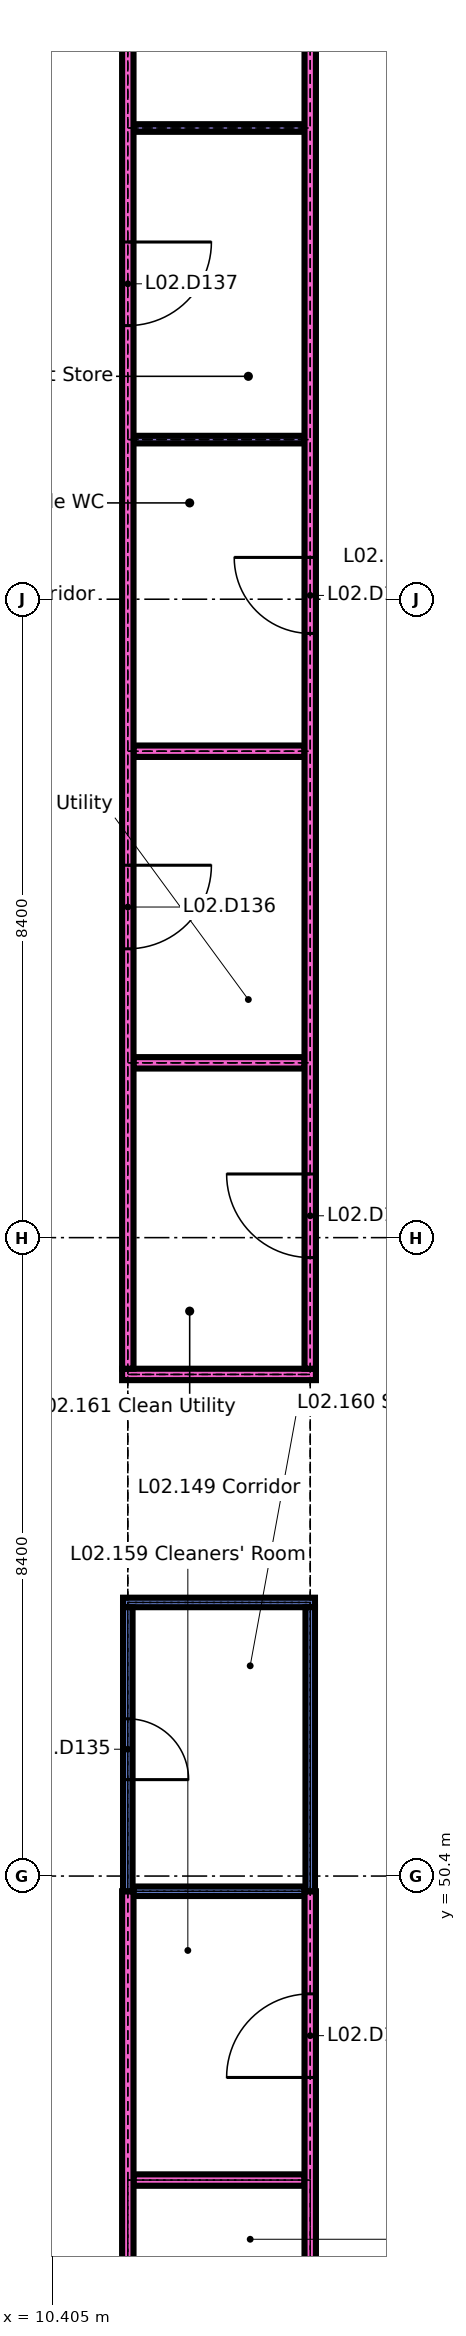
"""IFC4 building model, lengths in metres.
Left out: names, types, materials, properties, quantities, classifications, styles, units other than length and angle.
Written with IfcOpenShell. Run it as: python <this file> out.ifc"""

import sys

from ifc_helpers import new_model, si_unit, direction, frame, frame_2d, origin, place, context, subcontext, project, spatial, rectangle, extrude, element, fill, save


model = new_model("IFC4")
c1 = context("Model", 3, precision=1e-05, world=origin(), true_north=direction((0.0, 1.0)))
c2 = subcontext(c1, "Body", "Model", "MODEL_VIEW")
j1 = project(units=[si_unit("LENGTHUNIT", "METRE"), si_unit("PLANEANGLEUNIT", "RADIAN")], contexts=[c1])
p1 = place(None, origin())
s1 = spatial("IfcSite", under=j1, at=p1, CompositionType="ELEMENT")
p2 = place(p1, origin())
s2 = spatial("IfcBuilding", under=s1, at=p2, CompositionType="ELEMENT")
p3 = place(p2, frame((0.0, 0.0, 8.4)))
s3 = spatial("IfcBuildingStorey", under=s2, at=p3, CompositionType="ELEMENT", Elevation=8.4)
p4 = place(p3, frame((11.475, 46.4, 0.0), z_axis=(0.0, 0.0, 1.0), x_axis=(1.0, 0.0, 0.0)))
e1 = element("IfcWall", 1, at=p4, inside=s3, PredefinedType="PARTITIONING", context=c2, shape_type="SweptSolid", body=[
    extrude(rectangle(XDim=2.25, YDim=0.15, at=frame_2d((1.125, 0.0))), origin(), (0.0, 0.0, 1.0), 4.2),
])
p5 = place(p3, frame((11.475, 50.2, 0.0), z_axis=(0.0, 0.0, 1.0), x_axis=(1.0, 0.0, 0.0)))
e2 = element("IfcWall", 2, at=p5, inside=s3, PredefinedType="SOLIDWALL", context=c2, shape_type="SweptSolid", body=[
    extrude(rectangle(XDim=2.25, YDim=0.125, at=frame_2d((1.125, 0.0))), origin(), (0.0, 0.0, 1.0), 4.2),
])
p6 = place(p3, frame((11.337, 54.0, 0.0), z_axis=(0.0, 0.0, 1.0), x_axis=(1.0, 0.0, 0.0)))
e3 = element("IfcWall", 3, at=p6, inside=s3, PredefinedType="SOLIDWALL", context=c2, shape_type="SweptSolid", body=[
    extrude(rectangle(XDim=2.525, YDim=0.125, at=frame_2d((1.263, 0.0))), origin(), (0.0, 0.0, 1.0), 4.2),
])
p7 = place(p3, frame((11.325, 57.0, 0.0), z_axis=(0.0, 0.0, 1.0), x_axis=(1.0, 0.0, 0.0)))
e4 = element("IfcWall", 4, at=p7, inside=s3, PredefinedType="PARTITIONING", context=c2, shape_type="SweptSolid", body=[
    extrude(rectangle(XDim=2.55, YDim=0.15, at=frame_2d((1.275, 0.0))), origin(), (0.0, 0.0, 1.0), 4.2),
])
for number, where, z_axis, x_axis in (
    (5, (11.475, 61.1, 0.0), (0.0, 0.0, 1.0), (1.0, 0.0, 0.0)),
    (6, (11.475, 65.2, 0.0), (0.0, 0.0, 1.0), (1.0, 0.0, 0.0)),
):
    element("IfcWall", number, at=place(p3, frame(where, z_axis=z_axis, x_axis=x_axis)), inside=s3, PredefinedType="PARTITIONING", context=c2, shape_type="SweptSolid", body=[
        extrude(rectangle(XDim=2.25, YDim=0.15, at=frame_2d((1.125, 0.0))), origin(), (0.0, 0.0, 1.0), 4.2),
    ])
for number, where, z_axis, x_axis in (
    (7, (11.475, 69.3, 0.0), (0.0, 0.0, 1.0), (1.0, 0.0, 0.0)),
    (8, (11.475, 73.4, 0.0), (0.0, 0.0, 1.0), (1.0, 0.0, 0.0)),
):
    element("IfcWall", number, at=place(p3, frame(where, z_axis=z_axis, x_axis=x_axis)), inside=s3, PredefinedType="PARTITIONING", context=c2, shape_type="SweptSolid", body=[
        extrude(rectangle(XDim=2.25, YDim=0.1, at=frame_2d((1.125, 0.0))), origin(), (0.0, 0.0, 1.0), 4.2),
    ])
p8 = place(p3, frame((11.4, 31.275, 0.0), z_axis=(0.0, 0.0, 1.0), x_axis=(0.0, 1.0, 0.0)))
e9 = element("IfcWall", 9, at=p8, inside=s3, PredefinedType="PARTITIONING", context=c2, shape_type="SweptSolid", body=[
    extrude(rectangle(XDim=18.925, YDim=0.15, at=frame_2d((9.462, 0.0))), origin(), (0.0, 0.0, 1.0), 4.2),
])
p9 = place(p8, frame((5.125, 0.0, 0.0)))
e10 = element("IfcOpeningElement", 10, at=p9, cuts=e9, PredefinedType="OPENING", context=c2, shape_type="SweptSolid", body=[
    extrude(rectangle(XDim=1.0, YDim=2.1, at=frame_2d((0.5, 1.05))), frame((0.0, 0.085, 0.0), z_axis=(0.0, -1.0, 0.0), x_axis=(1.0, 0.0, 0.0)), (0.0, 0.0, 1.0), 0.17),
])
p10 = place(p8, frame((12.725, 0.0, 0.0)))
e11 = element("IfcOpeningElement", 11, at=p10, cuts=e9, PredefinedType="OPENING", context=c2, shape_type="SweptSolid", body=[
    extrude(rectangle(XDim=1.0, YDim=2.1, at=frame_2d((0.5, 1.05))), frame((0.0, 0.085, 0.0), z_axis=(0.0, -1.0, 0.0), x_axis=(1.0, 0.0, 0.0)), (0.0, 0.0, 1.0), 0.17),
])
p11 = place(p3, frame((11.4, 50.2, 0.0), z_axis=(0.0, 0.0, 1.0), x_axis=(0.0, 1.0, 0.0)))
e12 = element("IfcWall", 12, at=p11, inside=s3, PredefinedType="SOLIDWALL", context=c2, shape_type="SweptSolid", body=[
    extrude(rectangle(XDim=3.738, YDim=0.125, at=frame_2d((1.869, 0.0))), origin(), (0.0, 0.0, 1.0), 4.2),
])
p12 = place(p11, frame((1.469, 0.0, 0.0)))
e13 = element("IfcOpeningElement", 13, at=p12, cuts=e12, PredefinedType="OPENING", context=c2, shape_type="SweptSolid", body=[
    extrude(rectangle(XDim=0.8, YDim=2.1, at=frame_2d((0.4, 1.05))), frame((0.0, 0.073, 0.0), z_axis=(0.0, -1.0, 0.0), x_axis=(1.0, 0.0, 0.0)), (0.0, 0.0, 1.0), 0.145),
])
p13 = place(p3, frame((11.4, 57.075, 0.0), z_axis=(0.0, 0.0, 1.0), x_axis=(0.0, 1.0, 0.0)))
e14 = element("IfcWall", 14, at=p13, inside=s3, PredefinedType="PARTITIONING", context=c2, shape_type="SweptSolid", body=[
    extrude(rectangle(XDim=32.85, YDim=0.15, at=frame_2d((16.425, 0.0))), origin(), (0.0, 0.0, 1.0), 4.2),
])
p14 = place(p13, frame((5.525, 0.0, 0.0)))
e15 = element("IfcOpeningElement", 15, at=p14, cuts=e14, PredefinedType="OPENING", context=c2, shape_type="SweptSolid", body=[
    extrude(rectangle(XDim=1.1, YDim=2.1, at=frame_2d((0.55, 1.05))), frame((0.0, 0.085, 0.0), z_axis=(0.0, -1.0, 0.0), x_axis=(1.0, 0.0, 0.0)), (0.0, 0.0, 1.0), 0.17),
])
p15 = place(p13, frame((13.725, 0.0, 0.0)))
e16 = element("IfcOpeningElement", 16, at=p15, cuts=e14, PredefinedType="OPENING", context=c2, shape_type="SweptSolid", body=[
    extrude(rectangle(XDim=1.1, YDim=2.1, at=frame_2d((0.55, 1.05))), frame((0.0, 0.085, 0.0), z_axis=(0.0, -1.0, 0.0), x_axis=(1.0, 0.0, 0.0)), (0.0, 0.0, 1.0), 0.17),
])
p16 = place(p13, frame((21.925, 0.0, 0.0)))
e17 = element("IfcOpeningElement", 17, at=p16, cuts=e14, PredefinedType="OPENING", context=c2, shape_type="SweptSolid", body=[
    extrude(rectangle(XDim=1.1, YDim=2.1, at=frame_2d((0.55, 1.05))), frame((0.0, 0.085, 0.0), z_axis=(0.0, -1.0, 0.0), x_axis=(1.0, 0.0, 0.0)), (0.0, 0.0, 1.0), 0.17),
])
p17 = place(p13, frame((30.188, 0.0, 0.0)))
e18 = element("IfcOpeningElement", 18, at=p17, cuts=e14, PredefinedType="OPENING", context=c2, shape_type="SweptSolid", body=[
    extrude(rectangle(XDim=1.1, YDim=2.1, at=frame_2d((0.55, 1.05))), frame((0.0, 0.085, 0.0), z_axis=(0.0, -1.0, 0.0), x_axis=(1.0, 0.0, 0.0)), (0.0, 0.0, 1.0), 0.17),
])
p18 = place(p3, frame((13.8, 31.275, 0.0), z_axis=(0.0, 0.0, 1.0), x_axis=(0.0, 1.0, 0.0)))
e19 = element("IfcWall", 19, at=p18, inside=s3, PredefinedType="PARTITIONING", context=c2, shape_type="SweptSolid", body=[
    extrude(rectangle(XDim=18.925, YDim=0.15, at=frame_2d((9.462, 0.0))), origin(), (0.0, 0.0, 1.0), 4.2),
])
p19 = place(p18, frame((1.312, 0.0, 0.0)))
e20 = element("IfcOpeningElement", 20, at=p19, cuts=e19, PredefinedType="OPENING", context=c2, shape_type="SweptSolid", body=[
    extrude(rectangle(XDim=1.1, YDim=2.1, at=frame_2d((0.55, 1.05))), frame((0.0, 0.085, 0.0), z_axis=(0.0, -1.0, 0.0), x_axis=(1.0, 0.0, 0.0)), (0.0, 0.0, 1.0), 0.17),
])
p20 = place(p18, frame((8.875, 0.0, 0.0)))
e21 = element("IfcOpeningElement", 21, at=p20, cuts=e19, PredefinedType="OPENING", context=c2, shape_type="SweptSolid", body=[
    extrude(rectangle(XDim=1.1, YDim=2.1, at=frame_2d((0.55, 1.05))), frame((0.0, 0.085, 0.0), z_axis=(0.0, -1.0, 0.0), x_axis=(1.0, 0.0, 0.0)), (0.0, 0.0, 1.0), 0.17),
])
p21 = place(p18, frame((16.475, 0.0, 0.0)))
e22 = element("IfcOpeningElement", 22, at=p21, cuts=e19, PredefinedType="OPENING", context=c2, shape_type="SweptSolid", body=[
    extrude(rectangle(XDim=1.1, YDim=2.1, at=frame_2d((0.55, 1.05))), frame((0.0, 0.085, 0.0), z_axis=(0.0, -1.0, 0.0), x_axis=(1.0, 0.0, 0.0)), (0.0, 0.0, 1.0), 0.17),
])
p22 = place(p3, frame((13.8, 50.2, 0.0), z_axis=(0.0, 0.0, 1.0), x_axis=(0.0, 1.0, 0.0)))
e23 = element("IfcWall", 23, at=p22, inside=s3, PredefinedType="SOLIDWALL", context=c2, shape_type="SweptSolid", body=[
    extrude(rectangle(XDim=3.738, YDim=0.125, at=frame_2d((1.869, 0.0))), origin(), (0.0, 0.0, 1.0), 4.2),
])
p23 = place(p3, frame((13.8, 57.075, 0.0), z_axis=(0.0, 0.0, 1.0), x_axis=(0.0, 1.0, 0.0)))
e24 = element("IfcWall", 24, at=p23, inside=s3, PredefinedType="PARTITIONING", context=c2, shape_type="SweptSolid", body=[
    extrude(rectangle(XDim=32.85, YDim=0.15, at=frame_2d((16.425, 0.0))), origin(), (0.0, 0.0, 1.0), 4.2),
])
p24 = place(p23, frame((1.462, 0.0, 0.0)))
e25 = element("IfcOpeningElement", 25, at=p24, cuts=e24, PredefinedType="OPENING", context=c2, shape_type="SweptSolid", body=[
    extrude(rectangle(XDim=1.1, YDim=2.1, at=frame_2d((0.55, 1.05))), frame((0.0, 0.085, 0.0), z_axis=(0.0, -1.0, 0.0), x_axis=(1.0, 0.0, 0.0)), (0.0, 0.0, 1.0), 0.17),
])
p25 = place(p23, frame((9.675, 0.0, 0.0)))
e26 = element("IfcOpeningElement", 26, at=p25, cuts=e24, PredefinedType="OPENING", context=c2, shape_type="SweptSolid", body=[
    extrude(rectangle(XDim=1.0, YDim=2.1, at=frame_2d((0.5, 1.05))), frame((0.0, 0.085, 0.0), z_axis=(0.0, -1.0, 0.0), x_axis=(1.0, 0.0, 0.0)), (0.0, 0.0, 1.0), 0.17),
])
p26 = place(p23, frame((17.875, 0.0, 0.0)))
e27 = element("IfcOpeningElement", 27, at=p26, cuts=e24, PredefinedType="OPENING", context=c2, shape_type="SweptSolid", body=[
    extrude(rectangle(XDim=1.0, YDim=2.1, at=frame_2d((0.5, 1.05))), frame((0.0, 0.085, 0.0), z_axis=(0.0, -1.0, 0.0), x_axis=(1.0, 0.0, 0.0)), (0.0, 0.0, 1.0), 0.17),
])
p27 = place(p23, frame((26.075, 0.0, 0.0)))
e28 = element("IfcOpeningElement", 28, at=p27, cuts=e24, PredefinedType="OPENING", context=c2, shape_type="SweptSolid", body=[
    extrude(rectangle(XDim=1.0, YDim=2.1, at=frame_2d((0.5, 1.05))), frame((0.0, 0.085, 0.0), z_axis=(0.0, -1.0, 0.0), x_axis=(1.0, 0.0, 0.0)), (0.0, 0.0, 1.0), 0.17),
])
p28 = place(p12, origin())
e29 = element("IfcDoor", 29, at=p28, inside=s3, OperationType="SINGLE_SWING_LEFT", PredefinedType="DOOR", context=c2, shape_type="SweptSolid", body=[
    extrude(rectangle(XDim=0.8, YDim=2.1, at=frame_2d((0.4, 1.05))), frame((0.0, 0.03, 0.0), z_axis=(0.0, -1.0, 0.0), x_axis=(1.0, 0.0, 0.0)), (0.0, 0.0, 1.0), 0.06),
])
fill(e13, e29)
p29 = place(p14, origin())
e30 = element("IfcDoor", 30, at=p29, inside=s3, OperationType="SINGLE_SWING_RIGHT", PredefinedType="DOOR", context=c2, shape_type="SweptSolid", body=[
    extrude(rectangle(XDim=1.1, YDim=2.1, at=frame_2d((0.55, 1.05))), frame((0.0, 0.025, 0.0), z_axis=(0.0, -1.0, 0.0), x_axis=(1.0, 0.0, 0.0)), (0.0, 0.0, 1.0), 0.05),
])
fill(e15, e30)
p30 = place(p15, origin())
e31 = element("IfcDoor", 31, at=p30, inside=s3, OperationType="SINGLE_SWING_RIGHT", PredefinedType="DOOR", context=c2, shape_type="SweptSolid", body=[
    extrude(rectangle(XDim=1.1, YDim=2.1, at=frame_2d((0.55, 1.05))), frame((0.0, 0.025, 0.0), z_axis=(0.0, -1.0, 0.0), x_axis=(1.0, 0.0, 0.0)), (0.0, 0.0, 1.0), 0.05),
])
fill(e16, e31)
p31 = place(p21, origin())
e32 = element("IfcDoor", 32, at=p31, inside=s3, OperationType="SINGLE_SWING_RIGHT", PredefinedType="DOOR", context=c2, shape_type="SweptSolid", body=[
    extrude(rectangle(XDim=1.1, YDim=2.1, at=frame_2d((0.55, 1.05))), frame((0.0, 0.025, 0.0), z_axis=(0.0, -1.0, 0.0), x_axis=(1.0, 0.0, 0.0)), (0.0, 0.0, 1.0), 0.05),
])
fill(e22, e32)
p32 = place(p24, origin())
e33 = element("IfcDoor", 33, at=p32, inside=s3, OperationType="SINGLE_SWING_LEFT", PredefinedType="DOOR", context=c2, shape_type="SweptSolid", body=[
    extrude(rectangle(XDim=1.1, YDim=2.1, at=frame_2d((0.55, 1.05))), frame((0.0, 0.025, 0.0), z_axis=(0.0, -1.0, 0.0), x_axis=(1.0, 0.0, 0.0)), (0.0, 0.0, 1.0), 0.05),
])
fill(e25, e33)
p33 = place(p25, origin())
e34 = element("IfcDoor", 34, at=p33, inside=s3, OperationType="SINGLE_SWING_LEFT", PredefinedType="DOOR", context=c2, shape_type="SweptSolid", body=[
    extrude(rectangle(XDim=1.0, YDim=2.1, at=frame_2d((0.5, 1.05))), frame((0.0, 0.025, 0.0), z_axis=(0.0, -1.0, 0.0), x_axis=(1.0, 0.0, 0.0)), (0.0, 0.0, 1.0), 0.05),
])
fill(e26, e34)
save(model, sys.argv[1])
